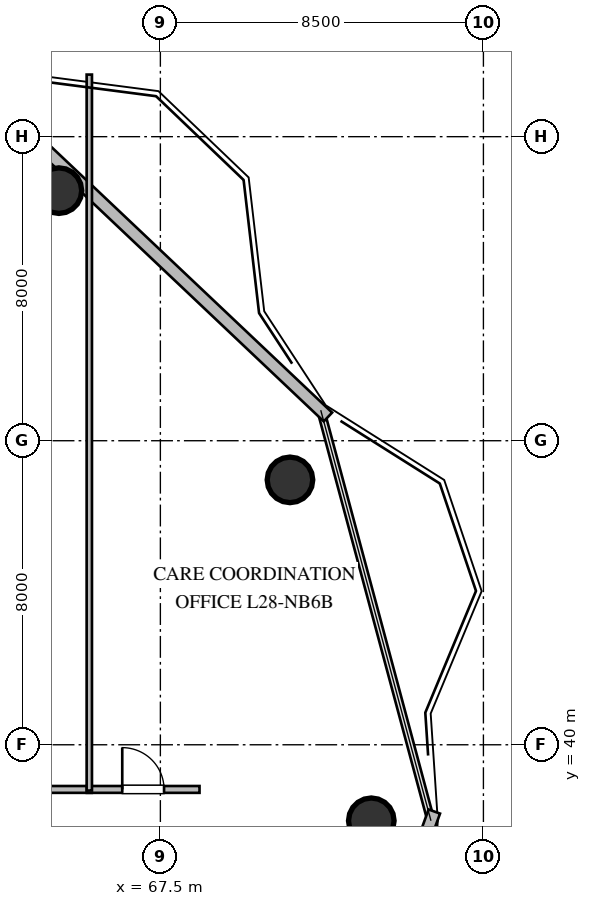
"""IFC4 building model, lengths in metres.
Left out: names, types, materials, properties, quantities, classifications, styles, units other than length and angle.
Written with IfcOpenShell. Run it as: python <this file> out.ifc"""

import sys

from ifc_helpers import new_model, si_unit, direction, frame, frame_2d, origin, origin_2d, place, context, subcontext, project, spatial, rectangle, circle, extrude, element, fill, save


model = new_model("IFC4")
c1 = context("Model", 3, precision=1e-05, world=origin(), true_north=direction((0.0, 1.0)))
c2 = subcontext(c1, "Body", "Model", "MODEL_VIEW")
j1 = project(units=[si_unit("LENGTHUNIT", "METRE"), si_unit("PLANEANGLEUNIT", "RADIAN")], contexts=[c1])
p1 = place(None, origin())
s1 = spatial("IfcSite", under=j1, at=p1, CompositionType="ELEMENT")
p2 = place(p1, origin())
s2 = spatial("IfcBuilding", under=s1, at=p2, CompositionType="ELEMENT")
p3 = place(p2, frame((0.0, 0.0, 109.8)))
s3 = spatial("IfcBuildingStorey", under=s2, at=p3, CompositionType="ELEMENT", Elevation=109.8)
for number, where, z_axis, x_axis in (
    (1, (73.05, 38.0, 0.0), (0.0, 0.0, 1.0), (1.0, 0.0, 0.0)),
    (2, (70.91, 46.97, 0.0), (0.0, 0.0, 1.0), (1.0, 0.0, 0.0)),
    (3, (64.83, 54.58, 0.0), (0.0, 0.0, 1.0), (1.0, 0.0, 0.0)),
):
    element("IfcColumn", number, at=place(p3, frame(where, z_axis=z_axis, x_axis=x_axis)), inside=s3, PredefinedType="COLUMN", context=c2, shape_type="SweptSolid", body=[
        extrude(circle(Radius=0.6, at=origin_2d()), origin(), (0.0, 0.0, 1.0), 3.6),
    ])
p4 = place(p3, frame((74.708, 38.244, 0.0), z_axis=(0.0, 0.0, 1.0), x_axis=(-0.340324669139, -0.94030799187, 0.0)))
e4 = element("IfcWall", 4, at=p4, inside=s3, PredefinedType="STANDARD", context=c2, shape_type="SweptSolid", body=[
    extrude(rectangle(XDim=13.81, YDim=0.32, at=frame_2d((6.905, 0.0))), origin(), (0.0, 0.0, 1.0), 3.36),
])
p5 = place(p3, frame((60.538, 59.383, 0.0), z_axis=(0.0, 0.0, 1.0), x_axis=(0.726378346584, -0.687295058628, 0.0)))
e5 = element("IfcWall", 5, at=p5, inside=s3, PredefinedType="STANDARD", context=c2, shape_type="SweptSolid", body=[
    extrude(rectangle(XDim=15.654, YDim=0.32, at=frame_2d((7.827, 0.0))), origin(), (0.0, 0.0, 1.0), 3.36),
])
p6 = place(p3, frame((55.435, 38.825, 0.0), z_axis=(0.0, 0.0, 1.0), x_axis=(1.0, 0.0, 0.0)))
e6 = element("IfcWall", 6, at=p6, inside=s3, PredefinedType="PARTITIONING", context=c2, shape_type="SweptSolid", body=[
    extrude(rectangle(XDim=10.26, YDim=0.18, at=frame_2d((5.13, 0.0))), origin(), (0.0, 0.0, 1.0), 3.36),
])
p7 = place(p6, frame((4.58, 0.0, 0.0)))
e7 = element("IfcOpeningElement", 7, at=p7, cuts=e6, PredefinedType="OPENING", context=c2, shape_type="SweptSolid", body=[
    extrude(rectangle(XDim=1.1, YDim=2.1, at=frame_2d((0.55, 1.05))), frame((0.0, 0.1, 0.0), z_axis=(0.0, -1.0, 0.0), x_axis=(1.0, 0.0, 0.0)), (0.0, 0.0, 1.0), 0.2),
])
p8 = place(p3, frame((65.565, 38.825, 0.0), z_axis=(0.0, 0.0, 1.0), x_axis=(1.0, 0.0, 0.0)))
e8 = element("IfcWall", 8, at=p8, inside=s3, PredefinedType="PARTITIONING", context=c2, shape_type="SweptSolid", body=[
    extrude(rectangle(XDim=2.965, YDim=0.18, at=frame_2d((1.482, 0.0))), origin(), (0.0, 0.0, 1.0), 3.36),
])
p9 = place(p8, frame((0.932, 0.0, 0.0)))
e9 = element("IfcOpeningElement", 9, at=p9, cuts=e8, PredefinedType="OPENING", context=c2, shape_type="SweptSolid", body=[
    extrude(rectangle(XDim=1.1, YDim=2.1, at=frame_2d((0.55, 1.05))), frame((0.0, 0.1, 0.0), z_axis=(0.0, -1.0, 0.0), x_axis=(1.0, 0.0, 0.0)), (0.0, 0.0, 1.0), 0.2),
])
p10 = place(p3, frame((65.63, 57.634, 0.0), z_axis=(0.0, 0.0, 1.0), x_axis=(0.0, -1.0, 0.0)))
e10 = element("IfcWall", 10, at=p10, inside=s3, PredefinedType="PARTITIONING", context=c2, shape_type="SweptSolid", body=[
    extrude(rectangle(XDim=18.839, YDim=0.14, at=frame_2d((9.419, 0.0))), origin(), (0.0, 0.0, 1.0), 3.36),
])
p11 = place(p9, origin())
e11 = element("IfcDoor", 11, at=p11, inside=s3, OperationType="SINGLE_SWING_LEFT", PredefinedType="DOOR", context=c2, shape_type="SweptSolid", body=[
    extrude(rectangle(XDim=1.1, YDim=2.1, at=frame_2d((0.55, 1.05))), frame((0.0, 0.025, 0.0), z_axis=(0.0, -1.0, 0.0), x_axis=(1.0, 0.0, 0.0)), (0.0, 0.0, 1.0), 0.05),
])
fill(e9, e11)
save(model, sys.argv[1])
